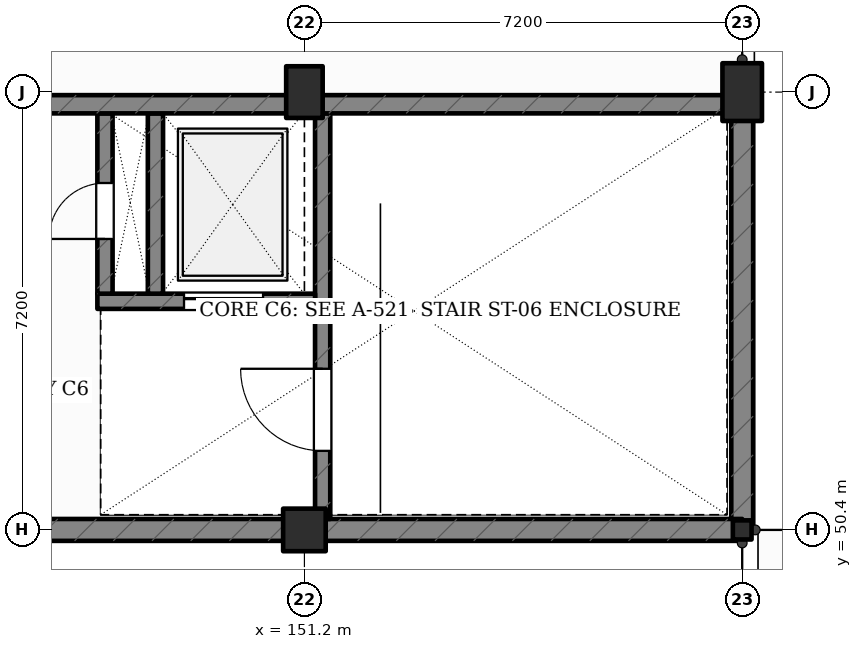
"""IFC4 building model, lengths in metres.
Left out: names, types, materials, properties, quantities, classifications, styles, units other than length and angle.
Written with IfcOpenShell. Run it as: python <this file> out.ifc"""

import sys

from ifc_helpers import new_model, si_unit, direction, frame, frame_2d, origin, origin_2d, place, context, subcontext, project, spatial, rectangle, i_section, extrude, element, fill, save


model = new_model("IFC4")
c1 = context("Model", 3, precision=1e-05, world=origin(), true_north=direction((0.0, 1.0)))
c2 = subcontext(c1, "Body", "Model", "MODEL_VIEW")
j1 = project(units=[si_unit("LENGTHUNIT", "METRE"), si_unit("PLANEANGLEUNIT", "RADIAN")], contexts=[c1])
p1 = place(None, origin())
s1 = spatial("IfcSite", under=j1, at=p1, CompositionType="ELEMENT")
p2 = place(p1, origin())
s2 = spatial("IfcBuilding", under=s1, at=p2, CompositionType="ELEMENT")
p3 = place(p2, frame((0.0, 0.0, 5.4)))
s3 = spatial("IfcBuildingStorey", under=s2, at=p3, CompositionType="ELEMENT", Elevation=5.4)
p4 = place(p3, frame((151.2, 50.4, 0.0), z_axis=(0.0, 0.0, 1.0), x_axis=(1.0, 0.0, 0.0)))
e1 = element("IfcColumn", 1, at=p4, inside=s3, PredefinedType="COLUMN", context=c2, shape_type="SweptSolid", body=[
    extrude(rectangle(XDim=0.7, YDim=0.7, at=origin_2d()), origin(), (0.0, 0.0, 1.0), 4.5),
])
p5 = place(p3, frame((151.2, 57.6, 0.0), z_axis=(0.0, 0.0, 1.0), x_axis=(1.0, 0.0, 0.0)))
e2 = element("IfcColumn", 2, at=p5, inside=s3, PredefinedType="COLUMN", context=c2, shape_type="SweptSolid", body=[
    extrude(rectangle(XDim=0.6, YDim=0.85, at=origin_2d()), origin(), (0.0, 0.0, 1.0), 4.5),
])
p6 = place(p3, frame((158.4, 50.4, 0.0), z_axis=(0.0, 0.0, 1.0), x_axis=(1.0, 0.0, 0.0)))
e3 = element("IfcColumn", 3, at=p6, inside=s3, PredefinedType="COLUMN", context=c2, shape_type="SweptSolid", body=[
    extrude(i_section(OverallWidth=0.307, OverallDepth=0.314, WebThickness=0.012, FlangeThickness=0.019, FilletRadius=0.015, at=origin_2d()), origin(), (0.0, 0.0, 1.0), 4.5),
])
p7 = place(p3, frame((158.4, 57.6, 0.0), z_axis=(0.0, 0.0, 1.0), x_axis=(1.0, 0.0, 0.0)))
e4 = element("IfcColumn", 4, at=p7, inside=s3, PredefinedType="COLUMN", context=c2, shape_type="SweptSolid", body=[
    extrude(rectangle(XDim=0.65, YDim=0.95, at=origin_2d()), origin(), (0.0, 0.0, 1.0), 4.5),
])
p8 = place(p3, frame((158.4, 57.6, 0.0), z_axis=(0.0, 0.0, 1.0), x_axis=(0.0, -1.0, 0.0)))
e5 = element("IfcWall", 5, at=p8, inside=s3, PredefinedType="SHEAR", context=c2, shape_type="SweptSolid", body=[
    extrude(rectangle(XDim=7.2, YDim=0.36, at=frame_2d((3.6, 0.0))), origin(), (0.0, 0.0, 1.0), 3.533),
])
p9 = place(p3, frame((158.4, 50.4, 0.0), z_axis=(0.0, 0.0, 1.0), x_axis=(-1.0, 0.0, 0.0)))
e6 = element("IfcWall", 6, at=p9, inside=s3, PredefinedType="SHEAR", context=c2, shape_type="SweptSolid", body=[
    extrude(rectangle(XDim=7.2, YDim=0.36, at=frame_2d((3.6, 0.0))), origin(), (0.0, 0.0, 1.0), 3.533),
])
p10 = place(p3, frame((151.2, 50.4, 0.0), z_axis=(0.0, 0.0, 1.0), x_axis=(-1.0, 0.0, 0.0)))
e7 = element("IfcWall", 7, at=p10, inside=s3, PredefinedType="SHEAR", context=c2, shape_type="SweptSolid", body=[
    extrude(rectangle(XDim=7.2, YDim=0.36, at=frame_2d((3.6, 0.0))), origin(), (0.0, 0.0, 1.0), 3.75),
])
p11 = place(p3, frame((151.5, 50.58, 0.0), z_axis=(0.0, 0.0, 1.0), x_axis=(0.0, 1.0, 0.0)))
e8 = element("IfcWall", 8, at=p11, inside=s3, PredefinedType="SHEAR", context=c2, shape_type="SweptSolid", body=[
    extrude(rectangle(XDim=6.67, YDim=0.25, at=frame_2d((3.335, 0.0))), origin(), (0.0, 0.0, 1.0), 3.55),
])
p12 = place(p11, frame((1.12, 0.0, 0.0)))
e9 = element("IfcOpeningElement", 9, at=p12, cuts=e8, PredefinedType="OPENING", context=c2, shape_type="SweptSolid", body=[
    extrude(rectangle(XDim=1.35, YDim=2.15, at=frame_2d((0.675, 1.075))), frame((0.0, 0.135, 0.0), z_axis=(0.0, -1.0, 0.0), x_axis=(1.0, 0.0, 0.0)), (0.0, 0.0, 1.0), 0.27),
])
p13 = place(p3, frame((147.795, 54.16, 0.0), z_axis=(0.0, 0.0, 1.0), x_axis=(1.0, 0.0, 0.0)))
e10 = element("IfcWall", 10, at=p13, inside=s3, PredefinedType="SHEAR", context=c2, shape_type="SweptSolid", body=[
    extrude(rectangle(XDim=3.58, YDim=0.25, at=frame_2d((1.79, 0.0))), origin(), (0.0, 0.0, 1.0), 3.55),
])
p14 = place(p13, frame((1.425, 0.0, 0.0)))
e11 = element("IfcOpeningElement", 11, at=p14, cuts=e10, PredefinedType="OPENING", context=c2, shape_type="SweptSolid", body=[
    extrude(rectangle(XDim=1.3, YDim=2.2, at=frame_2d((0.65, 1.1))), frame((0.0, 0.135, 0.0), z_axis=(0.0, -1.0, 0.0), x_axis=(1.0, 0.0, 0.0)), (0.0, 0.0, 1.0), 0.27),
])
p15 = place(p3, frame((148.75, 54.285, 0.0), z_axis=(0.0, 0.0, 1.0), x_axis=(0.0, 1.0, 0.0)))
e12 = element("IfcWall", 12, at=p15, inside=s3, PredefinedType="SHEAR", context=c2, shape_type="SweptSolid", body=[
    extrude(rectangle(XDim=2.965, YDim=0.25, at=frame_2d((1.482, 0.0))), origin(), (0.0, 0.0, 1.0), 3.55),
])
p16 = place(p3, frame((147.92, 54.285, 0.0), z_axis=(0.0, 0.0, 1.0), x_axis=(0.0, 1.0, 0.0)))
e13 = element("IfcWall", 13, at=p16, inside=s3, PredefinedType="SHEAR", context=c2, shape_type="SweptSolid", body=[
    extrude(rectangle(XDim=2.965, YDim=0.25, at=frame_2d((1.482, 0.0))), origin(), (0.0, 0.0, 1.0), 3.55),
])
p17 = place(p16, frame((0.9, 0.0, 0.0)))
e14 = element("IfcOpeningElement", 14, at=p17, cuts=e13, PredefinedType="OPENING", context=c2, shape_type="SweptSolid", body=[
    extrude(rectangle(XDim=0.92, YDim=2.05, at=frame_2d((0.46, 1.025))), frame((0.0, 0.135, 0.0), z_axis=(0.0, -1.0, 0.0), x_axis=(1.0, 0.0, 0.0)), (0.0, 0.0, 1.0), 0.27),
])
p18 = place(p3, frame((144.0, 57.4, 0.0), z_axis=(0.0, 0.0, 1.0), x_axis=(1.0, 0.0, 0.0)))
e15 = element("IfcWall", 15, at=p18, inside=s3, PredefinedType="SHEAR", context=c2, shape_type="SweptSolid", body=[
    extrude(rectangle(XDim=14.23, YDim=0.3, at=frame_2d((7.115, 0.0))), origin(), (0.0, 0.0, 1.0), 3.55),
])
p19 = place(p12, origin())
e16 = element("IfcDoor", 16, at=p19, inside=s3, OperationType="SINGLE_SWING_RIGHT", PredefinedType="DOOR", context=c2, shape_type="SweptSolid", body=[
    extrude(rectangle(XDim=1.35, YDim=2.15, at=frame_2d((0.675, 1.075))), frame((0.0, 0.025, 0.0), z_axis=(0.0, -1.0, 0.0), x_axis=(1.0, 0.0, 0.0)), (0.0, 0.0, 1.0), 0.05),
])
fill(e9, e16)
p20 = place(p14, origin())
e17 = element("IfcDoor", 17, at=p20, inside=s3, OperationType="SLIDING_TO_LEFT", PredefinedType="DOOR", context=c2, shape_type="SweptSolid", body=[
    extrude(rectangle(XDim=1.3, YDim=2.2, at=frame_2d((0.65, 1.1))), frame((0.0, 0.025, 0.0), z_axis=(0.0, -1.0, 0.0), x_axis=(1.0, 0.0, 0.0)), (0.0, 0.0, 1.0), 0.05),
])
fill(e11, e17)
p21 = place(p17, origin())
e18 = element("IfcDoor", 18, at=p21, inside=s3, OperationType="SINGLE_SWING_LEFT", PredefinedType="DOOR", context=c2, shape_type="SweptSolid", body=[
    extrude(rectangle(XDim=0.92, YDim=2.05, at=frame_2d((0.46, 1.025))), frame((0.0, 0.025, 0.0), z_axis=(0.0, -1.0, 0.0), x_axis=(1.0, 0.0, 0.0)), (0.0, 0.0, 1.0), 0.05),
])
fill(e14, e18)
save(model, sys.argv[1])
